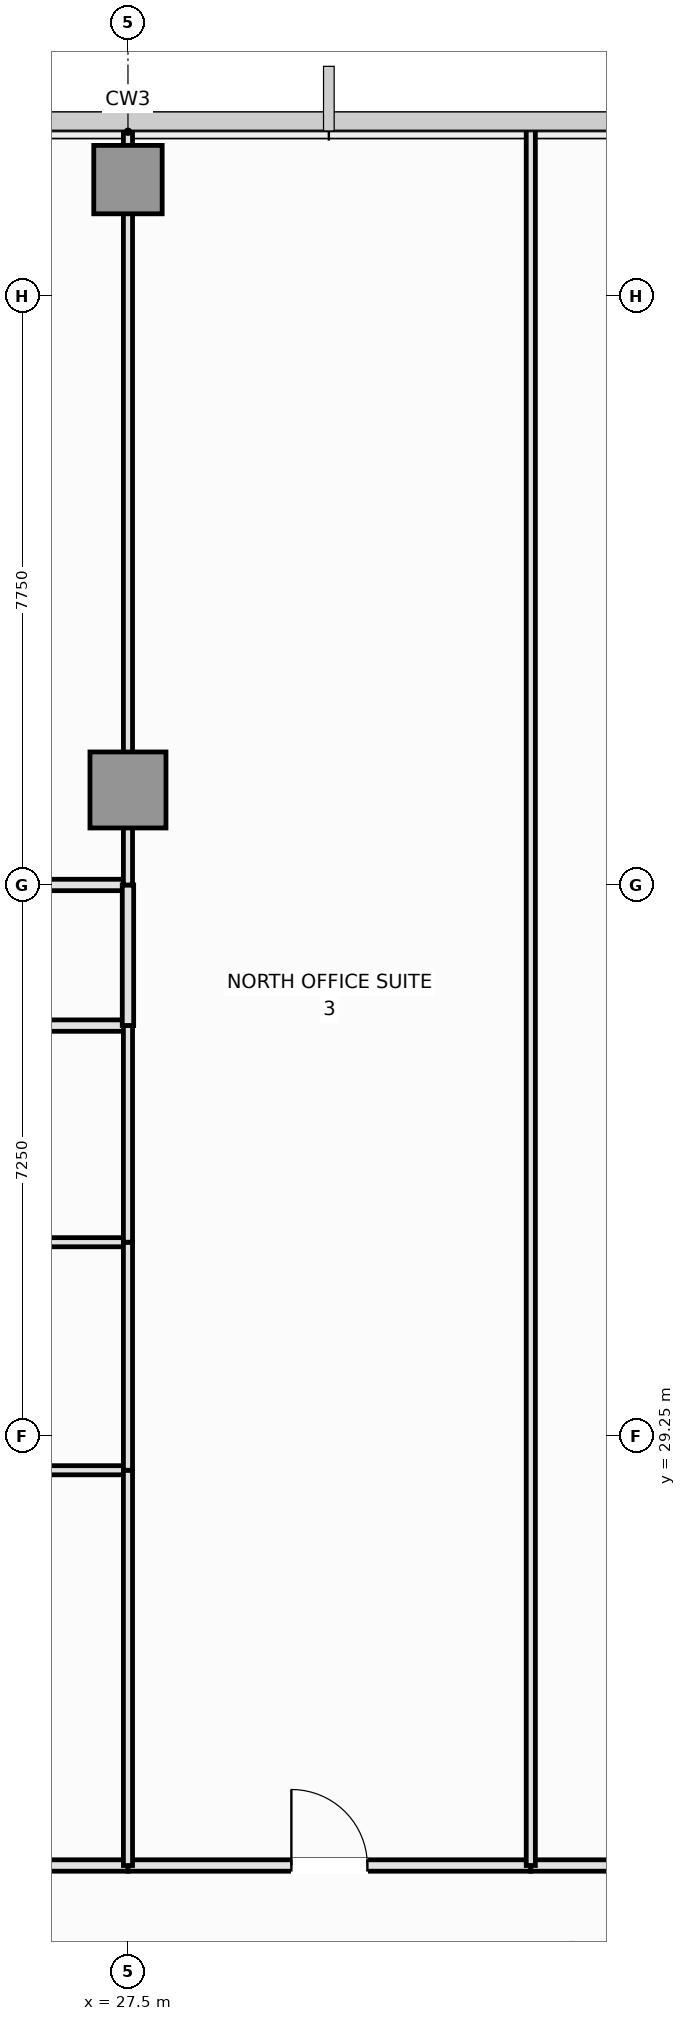
"""IFC4 building model, lengths in metres.
Left out: names, types, materials, properties, quantities, classifications, styles, units other than length and angle.
Written with IfcOpenShell. Run it as: python <this file> out.ifc"""

import sys

from ifc_helpers import new_model, si_unit, direction, frame, frame_2d, origin, origin_2d, place, context, subcontext, project, spatial, rectangle, extrude, element, fill, save


model = new_model("IFC4")
c1 = context("Model", 3, precision=1e-05, world=origin(), true_north=direction((0.0, 1.0)))
c2 = subcontext(c1, "Body", "Model", "MODEL_VIEW")
j1 = project(units=[si_unit("LENGTHUNIT", "METRE"), si_unit("PLANEANGLEUNIT", "RADIAN")], contexts=[c1])
p1 = place(None, origin())
s1 = spatial("IfcSite", under=j1, at=p1, CompositionType="ELEMENT")
p2 = place(p1, origin())
s2 = spatial("IfcBuilding", under=s1, at=p2, CompositionType="ELEMENT")
p3 = place(p2, frame((0.0, 0.0, 166.15)))
s3 = spatial("IfcBuildingStorey", under=s2, at=p3, CompositionType="ELEMENT", Elevation=166.15)
p4 = place(p3, frame((27.5, 37.75, 0.0), z_axis=(0.0, 0.0, 1.0), x_axis=(1.0, 0.0, 0.0)))
e1 = element("IfcColumn", 1, at=p4, inside=s3, PredefinedType="COLUMN", context=c2, shape_type="SweptSolid", body=[
    extrude(rectangle(XDim=1.0, YDim=1.0, at=origin_2d()), origin(), (0.0, 0.0, 1.0), 3.55),
])
p5 = place(p3, frame((27.5, 45.78, 0.0), z_axis=(0.0, 0.0, 1.0), x_axis=(1.0, 0.0, 0.0)))
e2 = element("IfcColumn", 2, at=p5, inside=s3, PredefinedType="COLUMN", context=c2, shape_type="SweptSolid", body=[
    extrude(rectangle(XDim=0.9, YDim=0.9, at=origin_2d()), origin(), (0.0, 0.0, 1.0), 3.55),
])
p6 = place(p3, frame((19.95, 23.6, 0.0), z_axis=(0.0, 0.0, 1.0), x_axis=(1.0, 0.0, 0.0)))
e3 = element("IfcWall", 3, at=p6, inside=s3, PredefinedType="PARTITIONING", context=c2, shape_type="SweptSolid", body=[
    extrude(rectangle(XDim=7.55, YDim=0.15, at=frame_2d((3.775, 0.0))), origin(), (0.0, 0.0, 1.0), 3.37),
])
p7 = place(p3, frame((27.5, 23.6, 0.0), z_axis=(0.0, 0.0, 1.0), x_axis=(1.0, 0.0, 0.0)))
e4 = element("IfcWall", 4, at=p7, inside=s3, PredefinedType="PARTITIONING", context=c2, shape_type="SweptSolid", body=[
    extrude(rectangle(XDim=5.3, YDim=0.15, at=frame_2d((2.65, 0.0))), origin(), (0.0, 0.0, 1.0), 3.37),
])
p8 = place(p7, frame((2.15, 0.0, 0.0)))
e5 = element("IfcOpeningElement", 5, at=p8, cuts=e4, PredefinedType="OPENING", context=c2, shape_type="SweptSolid", body=[
    extrude(rectangle(XDim=1.0, YDim=2.15, at=frame_2d((0.5, 1.075))), frame((0.0, 0.085, 0.0), z_axis=(0.0, -1.0, 0.0), x_axis=(1.0, 0.0, 0.0)), (0.0, 0.0, 1.0), 0.17),
])
p9 = place(p3, frame((32.8, 23.6, 0.0), z_axis=(0.0, 0.0, 1.0), x_axis=(1.0, 0.0, 0.0)))
e6 = element("IfcWall", 6, at=p9, inside=s3, PredefinedType="PARTITIONING", context=c2, shape_type="SweptSolid", body=[
    extrude(rectangle(XDim=5.4, YDim=0.15, at=frame_2d((2.7, 0.0))), origin(), (0.0, 0.0, 1.0), 3.37),
])
p10 = place(p9, frame((2.2, 0.0, 0.0)))
e7 = element("IfcOpeningElement", 7, at=p10, cuts=e6, PredefinedType="OPENING", context=c2, shape_type="SweptSolid", body=[
    extrude(rectangle(XDim=1.0, YDim=2.15, at=frame_2d((0.5, 1.075))), frame((0.0, 0.085, 0.0), z_axis=(0.0, -1.0, 0.0), x_axis=(1.0, 0.0, 0.0)), (0.0, 0.0, 1.0), 0.17),
])
p11 = place(p3, frame((19.95, 34.65, 0.0), z_axis=(0.0, 0.0, 1.0), x_axis=(1.0, 0.0, 0.0)))
e8 = element("IfcWall", 8, at=p11, inside=s3, PredefinedType="PARTITIONING", context=c2, shape_type="SweptSolid", body=[
    extrude(rectangle(XDim=7.55, YDim=0.15, at=frame_2d((3.775, 0.0))), origin(), (0.0, 0.0, 1.0), 3.37),
])
p12 = place(p3, frame((19.95, 36.5, 0.0), z_axis=(0.0, 0.0, 1.0), x_axis=(1.0, 0.0, 0.0)))
e9 = element("IfcWall", 9, at=p12, inside=s3, PredefinedType="PARTITIONING", context=c2, shape_type="SweptSolid", body=[
    extrude(rectangle(XDim=7.55, YDim=0.15, at=frame_2d((3.775, 0.0))), origin(), (0.0, 0.0, 1.0), 3.37),
])
p13 = place(p12, frame((3.275, 0.0, 0.0)))
e10 = element("IfcOpeningElement", 10, at=p13, cuts=e9, PredefinedType="OPENING", context=c2, shape_type="SweptSolid", body=[
    extrude(rectangle(XDim=1.0, YDim=2.15, at=frame_2d((0.5, 1.075))), frame((0.0, 0.085, 0.0), z_axis=(0.0, -1.0, 0.0), x_axis=(1.0, 0.0, 0.0)), (0.0, 0.0, 1.0), 0.17),
])
p14 = place(p3, frame((27.5, 34.65, 0.0), z_axis=(0.0, 0.0, 1.0), x_axis=(0.0, 1.0, 0.0)))
e11 = element("IfcWall", 11, at=p14, inside=s3, PredefinedType="PARTITIONING", context=c2, shape_type="SweptSolid", body=[
    extrude(rectangle(XDim=1.85, YDim=0.15, at=frame_2d((0.925, 0.0))), origin(), (0.0, 0.0, 1.0), 3.37),
])
p15 = place(p3, frame((19.95, 28.8, 0.0), z_axis=(0.0, 0.0, 1.0), x_axis=(1.0, 0.0, 0.0)))
e12 = element("IfcWall", 12, at=p15, inside=s3, PredefinedType="PARTITIONING", context=c2, shape_type="SweptSolid", body=[
    extrude(rectangle(XDim=7.55, YDim=0.12, at=frame_2d((3.775, 0.0))), origin(), (0.0, 0.0, 1.0), 3.37),
])
p16 = place(p3, frame((27.5, 23.6, 0.0), z_axis=(0.0, 0.0, 1.0), x_axis=(0.0, 1.0, 0.0)))
e13 = element("IfcWall", 13, at=p16, inside=s3, PredefinedType="PARTITIONING", context=c2, shape_type="SweptSolid", body=[
    extrude(rectangle(XDim=5.2, YDim=0.12, at=frame_2d((2.6, 0.0))), origin(), (0.0, 0.0, 1.0), 3.37),
])
p17 = place(p3, frame((19.95, 31.8, 0.0), z_axis=(0.0, 0.0, 1.0), x_axis=(1.0, 0.0, 0.0)))
e14 = element("IfcWall", 14, at=p17, inside=s3, PredefinedType="PARTITIONING", context=c2, shape_type="SweptSolid", body=[
    extrude(rectangle(XDim=7.55, YDim=0.12, at=frame_2d((3.775, 0.0))), origin(), (0.0, 0.0, 1.0), 3.37),
])
p18 = place(p3, frame((27.5, 28.8, 0.0), z_axis=(0.0, 0.0, 1.0), x_axis=(0.0, 1.0, 0.0)))
e15 = element("IfcWall", 15, at=p18, inside=s3, PredefinedType="PARTITIONING", context=c2, shape_type="SweptSolid", body=[
    extrude(rectangle(XDim=3.0, YDim=0.12, at=frame_2d((1.5, 0.0))), origin(), (0.0, 0.0, 1.0), 3.37),
])
p19 = place(p3, frame((27.5, 31.8, 0.0), z_axis=(0.0, 0.0, 1.0), x_axis=(0.0, 1.0, 0.0)))
e16 = element("IfcWall", 16, at=p19, inside=s3, PredefinedType="PARTITIONING", context=c2, shape_type="SweptSolid", body=[
    extrude(rectangle(XDim=2.85, YDim=0.12, at=frame_2d((1.425, 0.0))), origin(), (0.0, 0.0, 1.0), 3.37),
])
p20 = place(p3, frame((27.5, 36.5, 0.0), z_axis=(0.0, 0.0, 1.0), x_axis=(0.0, 1.0, 0.0)))
e17 = element("IfcWall", 17, at=p20, inside=s3, PredefinedType="PARTITIONING", context=c2, shape_type="SweptSolid", body=[
    extrude(rectangle(XDim=9.99, YDim=0.12, at=frame_2d((4.995, 0.0))), origin(), (0.0, 0.0, 1.0), 2.87),
])
p21 = place(p3, frame((32.8, 23.6, 0.0), z_axis=(0.0, 0.0, 1.0), x_axis=(0.0, 1.0, 0.0)))
e18 = element("IfcWall", 18, at=p21, inside=s3, PredefinedType="PARTITIONING", context=c2, shape_type="SweptSolid", body=[
    extrude(rectangle(XDim=22.89, YDim=0.12, at=frame_2d((11.445, 0.0))), origin(), (0.0, 0.0, 1.0), 3.37),
])
p22 = place(p8, origin())
e19 = element("IfcDoor", 19, at=p22, inside=s3, OperationType="SINGLE_SWING_LEFT", PredefinedType="DOOR", context=c2, shape_type="SweptSolid", body=[
    extrude(rectangle(XDim=1.0, YDim=2.15, at=frame_2d((0.5, 1.075))), frame((0.0, 0.025, 0.0), z_axis=(0.0, -1.0, 0.0), x_axis=(1.0, 0.0, 0.0)), (0.0, 0.0, 1.0), 0.05),
])
fill(e5, e19)
save(model, sys.argv[1])
